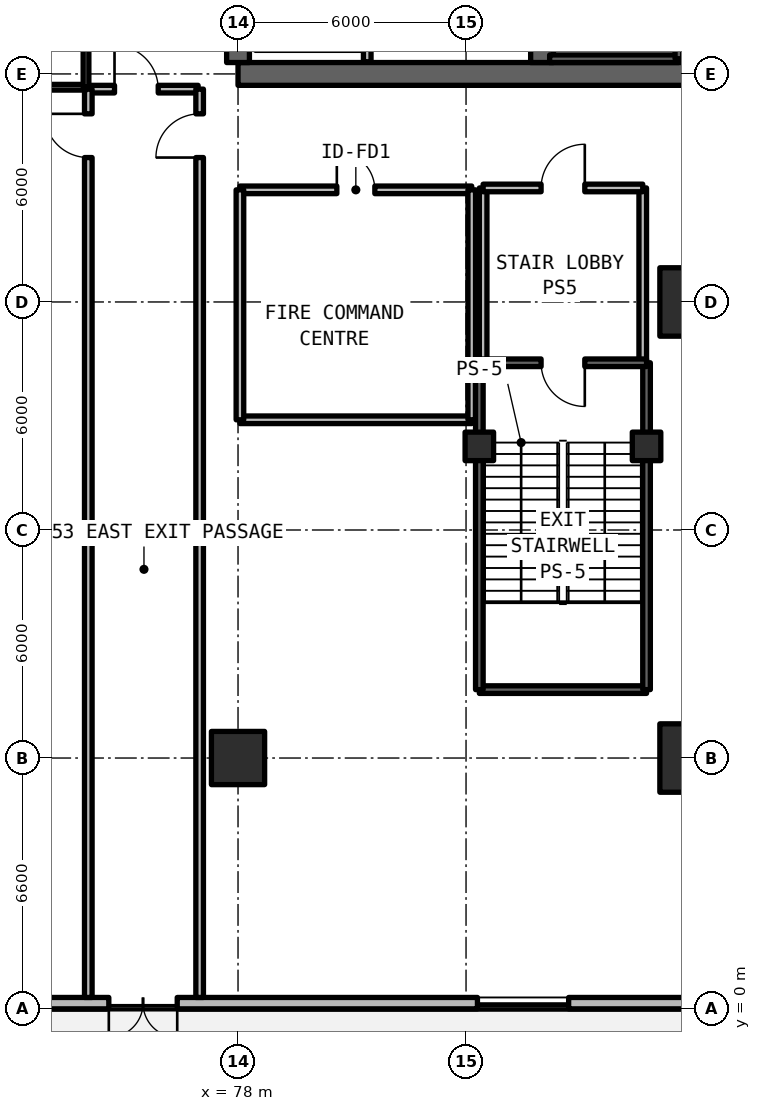
"""IFC4 building model, lengths in metres.
Left out: names, types, materials, properties, quantities, classifications, styles, units other than length and angle.
Written with IfcOpenShell. Run it as: python <this file> out.ifc"""

import sys

from ifc_helpers import new_model, si_unit, direction, frame, frame_2d, origin, origin_2d, place, context, subcontext, project, spatial, rectangle, circle, extrude, element, fill, save


model = new_model("IFC4")
c1 = context("Model", 3, precision=1e-05, world=origin(), true_north=direction((0.0, 1.0)))
c2 = subcontext(c1, "Body", "Model", "MODEL_VIEW")
j1 = project(units=[si_unit("LENGTHUNIT", "METRE"), si_unit("PLANEANGLEUNIT", "RADIAN")], contexts=[c1])
p1 = place(None, origin())
s1 = spatial("IfcSite", under=j1, at=p1, CompositionType="ELEMENT")
p2 = place(p1, origin())
s2 = spatial("IfcBuilding", under=s1, at=p2, CompositionType="ELEMENT")
p3 = place(p2, origin())
s3 = spatial("IfcBuildingStorey", under=s2, at=p3, CompositionType="ELEMENT", Elevation=0.0)
p4 = place(p3, frame((78.0, 24.6, 0.0), z_axis=(0.0, 0.0, 1.0), x_axis=(1.0, 0.0, 0.0)))
e1 = element("IfcWall", 1, at=p4, inside=s3, PredefinedType="SHEAR", context=c2, shape_type="SweptSolid", body=[
    extrude(rectangle(XDim=12.0, YDim=0.6, at=frame_2d((6.0, 0.0))), origin(), (0.0, 0.0, 1.0), 4.95),
])
p5 = place(p3, frame((78.0, 24.9, 0.0), z_axis=(0.0, 0.0, 1.0), x_axis=(0.0, 1.0, 0.0)))
e2 = element("IfcWall", 2, at=p5, inside=s3, PredefinedType="SHEAR", context=c2, shape_type="SweptSolid", body=[
    extrude(rectangle(XDim=8.9, YDim=0.6, at=frame_2d((4.45, 0.0))), origin(), (0.0, 0.0, 1.0), 4.95),
])
p6 = place(p3, frame((86.0, 24.9, 0.0), z_axis=(0.0, 0.0, 1.0), x_axis=(0.0, 1.0, 0.0)))
e3 = element("IfcWall", 3, at=p6, inside=s3, PredefinedType="SHEAR", context=c2, shape_type="SweptSolid", body=[
    extrude(rectangle(XDim=17.4, YDim=0.6, at=frame_2d((8.7, 0.0))), origin(), (0.0, 0.0, 1.0), 4.95),
])
p7 = place(p6, frame((0.35, 0.0, 0.0)))
e4 = element("IfcOpeningElement", 4, at=p7, cuts=e3, PredefinedType="OPENING", context=c2, shape_type="SweptSolid", body=[
    extrude(rectangle(XDim=1.15, YDim=2.15, at=frame_2d((0.575, 1.075))), frame((0.0, 0.31, 0.0), z_axis=(0.0, -1.0, 0.0), x_axis=(1.0, 0.0, 0.0)), (0.0, 0.0, 1.0), 0.62),
])
p8 = place(p6, frame((9.55, 0.0, 0.0)))
e5 = element("IfcOpeningElement", 5, at=p8, cuts=e3, PredefinedType="OPENING", context=c2, shape_type="SweptSolid", body=[
    extrude(rectangle(XDim=1.15, YDim=2.15, at=frame_2d((0.575, 1.075))), frame((0.0, 0.31, 0.0), z_axis=(0.0, -1.0, 0.0), x_axis=(1.0, 0.0, 0.0)), (0.0, 0.0, 1.0), 0.62),
])
p9 = place(p3, frame((78.0, 6.6, 0.0), z_axis=(0.0, 0.0, 1.0), x_axis=(1.0, 0.0, 0.0)))
e6 = element("IfcColumn", 6, at=p9, inside=s3, PredefinedType="COLUMN", context=c2, shape_type="SweptSolid", body=[
    extrude(circle(Radius=0.7, at=origin_2d()), origin(), (0.0, 0.0, 1.0), 4.95),
])
for number, where, z_axis, x_axis in (
    (7, (90.0, 6.6, 0.0), (0.0, 0.0, 1.0), (1.0, 0.0, 0.0)),
    (8, (90.0, 18.6, 0.0), (0.0, 0.0, 1.0), (1.0, 0.0, 0.0)),
):
    element("IfcColumn", number, at=place(p3, frame(where, z_axis=z_axis, x_axis=x_axis)), inside=s3, PredefinedType="COLUMN", context=c2, shape_type="SweptSolid", body=[
        extrude(rectangle(XDim=1.8, YDim=1.8, at=origin_2d()), origin(), (0.0, 0.0, 1.0), 4.95),
    ])
for number, where, z_axis, x_axis in (
    (9, (84.35, 14.8, 0.0), (0.0, 0.0, 1.0), (1.0, 0.0, 0.0)),
    (10, (88.75, 14.8, 0.0), (0.0, 0.0, 1.0), (1.0, 0.0, 0.0)),
):
    element("IfcColumn", number, at=place(p3, frame(where, z_axis=z_axis, x_axis=x_axis)), inside=s3, PredefinedType="COLUMN", context=c2, shape_type="SweptSolid", body=[
        extrude(rectangle(XDim=0.75, YDim=0.75, at=origin_2d()), origin(), (0.0, 0.0, 1.0), 4.95),
    ])
p10 = place(p3, frame((0.15, 0.15, 0.0), z_axis=(0.0, 0.0, 1.0), x_axis=(1.0, 0.0, 0.0)))
e11 = element("IfcWall", 11, at=p10, inside=s3, PredefinedType="SOLIDWALL", context=c2, shape_type="SweptSolid", body=[
    extrude(rectangle(XDim=113.7, YDim=0.3, at=frame_2d((56.85, 0.0))), origin(), (0.0, 0.0, 1.0), 4.67),
])
p11 = place(p10, frame((5.75, 0.0, 0.0)))
e12 = element("IfcOpeningElement", 12, at=p11, cuts=e11, PredefinedType="OPENING", context=c2, shape_type="SweptSolid", body=[
    extrude(rectangle(XDim=1.2, YDim=2.2, at=frame_2d((0.6, 1.1))), frame((0.0, 0.16, 0.0), z_axis=(0.0, -1.0, 0.0), x_axis=(1.0, 0.0, 0.0)), (0.0, 0.0, 1.0), 0.32),
])
p12 = place(p10, frame((17.05, 0.0, 0.0)))
e13 = element("IfcOpeningElement", 13, at=p12, cuts=e11, PredefinedType="OPENING", context=c2, shape_type="SweptSolid", body=[
    extrude(rectangle(XDim=4.2, YDim=3.2, at=frame_2d((2.1, 1.6))), frame((0.0, 0.16, 0.0), z_axis=(0.0, -1.0, 0.0), x_axis=(1.0, 0.0, 0.0)), (0.0, 0.0, 1.0), 0.32),
])
p13 = place(p10, frame((30.7, 0.0, 0.0)))
e14 = element("IfcOpeningElement", 14, at=p13, cuts=e11, PredefinedType="OPENING", context=c2, shape_type="SweptSolid", body=[
    extrude(rectangle(XDim=1.8, YDim=2.25, at=frame_2d((0.9, 1.125))), frame((0.0, 0.16, 0.0), z_axis=(0.0, -1.0, 0.0), x_axis=(1.0, 0.0, 0.0)), (0.0, 0.0, 1.0), 0.32),
])
p14 = place(p10, frame((40.95, 0.0, 0.0)))
e15 = element("IfcOpeningElement", 15, at=p14, cuts=e11, PredefinedType="OPENING", context=c2, shape_type="SweptSolid", body=[
    extrude(rectangle(XDim=1.8, YDim=2.25, at=frame_2d((0.9, 1.125))), frame((0.0, 0.16, 0.0), z_axis=(0.0, -1.0, 0.0), x_axis=(1.0, 0.0, 0.0)), (0.0, 0.0, 1.0), 0.32),
])
p15 = place(p10, frame((55.75, 0.0, 0.0)))
e16 = element("IfcOpeningElement", 16, at=p15, cuts=e11, PredefinedType="OPENING", context=c2, shape_type="SweptSolid", body=[
    extrude(rectangle(XDim=2.2, YDim=2.6, at=frame_2d((1.1, 1.3))), frame((0.0, 0.16, 0.0), z_axis=(0.0, -1.0, 0.0), x_axis=(1.0, 0.0, 0.0)), (0.0, 0.0, 1.0), 0.32),
])
p16 = place(p10, frame((74.45, 0.0, 0.0)))
e17 = element("IfcOpeningElement", 17, at=p16, cuts=e11, PredefinedType="OPENING", context=c2, shape_type="SweptSolid", body=[
    extrude(rectangle(XDim=1.8, YDim=2.25, at=frame_2d((0.9, 1.125))), frame((0.0, 0.16, 0.0), z_axis=(0.0, -1.0, 0.0), x_axis=(1.0, 0.0, 0.0)), (0.0, 0.0, 1.0), 0.32),
])
p17 = place(p10, frame((106.25, 0.0, 0.0)))
e18 = element("IfcOpeningElement", 18, at=p17, cuts=e11, PredefinedType="OPENING", context=c2, shape_type="SweptSolid", body=[
    extrude(rectangle(XDim=1.2, YDim=2.2, at=frame_2d((0.6, 1.1))), frame((0.0, 0.16, 0.0), z_axis=(0.0, -1.0, 0.0), x_axis=(1.0, 0.0, 0.0)), (0.0, 0.0, 1.0), 0.32),
])
p18 = place(p10, frame((68.18, 0.0, 0.78)))
e19 = element("IfcOpeningElement", 19, at=p18, cuts=e11, PredefinedType="OPENING", context=c2, shape_type="SweptSolid", body=[
    extrude(rectangle(XDim=2.4, YDim=1.66, at=frame_2d((1.2, 0.83))), frame((0.0, 0.16, 0.0), z_axis=(0.0, -1.0, 0.0), x_axis=(1.0, 0.0, 0.0)), (0.0, 0.0, 1.0), 0.32),
])
p19 = place(p10, frame((8.15, 0.0, 0.78)))
e20 = element("IfcOpeningElement", 20, at=p19, cuts=e11, PredefinedType="OPENING", context=c2, shape_type="SweptSolid", body=[
    extrude(rectangle(XDim=2.4, YDim=1.66, at=frame_2d((1.2, 0.83))), frame((0.0, 0.16, 0.0), z_axis=(0.0, -1.0, 0.0), x_axis=(1.0, 0.0, 0.0)), (0.0, 0.0, 1.0), 0.32),
])
p20 = place(p10, frame((84.15, 0.0, 0.78)))
e21 = element("IfcOpeningElement", 21, at=p20, cuts=e11, PredefinedType="OPENING", context=c2, shape_type="SweptSolid", body=[
    extrude(rectangle(XDim=2.4, YDim=1.66, at=frame_2d((1.2, 0.83))), frame((0.0, 0.16, 0.0), z_axis=(0.0, -1.0, 0.0), x_axis=(1.0, 0.0, 0.0)), (0.0, 0.0, 1.0), 0.32),
])
p21 = place(p10, frame((93.65, 0.0, 0.78)))
e22 = element("IfcOpeningElement", 22, at=p21, cuts=e11, PredefinedType="OPENING", context=c2, shape_type="SweptSolid", body=[
    extrude(rectangle(XDim=2.4, YDim=1.66, at=frame_2d((1.2, 0.83))), frame((0.0, 0.16, 0.0), z_axis=(0.0, -1.0, 0.0), x_axis=(1.0, 0.0, 0.0)), (0.0, 0.0, 1.0), 0.32),
])
p22 = place(p10, frame((103.15, 0.0, 0.78)))
e23 = element("IfcOpeningElement", 23, at=p22, cuts=e11, PredefinedType="OPENING", context=c2, shape_type="SweptSolid", body=[
    extrude(rectangle(XDim=2.4, YDim=1.66, at=frame_2d((1.2, 0.83))), frame((0.0, 0.16, 0.0), z_axis=(0.0, -1.0, 0.0), x_axis=(1.0, 0.0, 0.0)), (0.0, 0.0, 1.0), 0.32),
])
p23 = place(p3, frame((81.4, 24.92, 0.0), z_axis=(0.0, 0.0, 1.0), x_axis=(0.0, 1.0, 0.0)))
e24 = element("IfcWall", 24, at=p23, inside=s3, PredefinedType="SOLIDWALL", context=c2, shape_type="SweptSolid", body=[
    extrude(rectangle(XDim=3.58, YDim=0.2, at=frame_2d((1.79, 0.0))), origin(), (0.0, 0.0, 1.0), 3.89),
])
p24 = place(p23, frame((1.3, 0.0, 0.0)))
e25 = element("IfcOpeningElement", 25, at=p24, cuts=e24, PredefinedType="OPENING", context=c2, shape_type="SweptSolid", body=[
    extrude(rectangle(XDim=1.1, YDim=2.2, at=frame_2d((0.55, 1.1))), frame((0.0, 0.11, 0.0), z_axis=(0.0, -1.0, 0.0), x_axis=(1.0, 0.0, 0.0)), (0.0, 0.0, 1.0), 0.22),
])
p25 = place(p3, frame((74.1, 24.2, 0.0), z_axis=(0.0, 0.0, 1.0), x_axis=(1.0, 0.0, 0.0)))
e26 = element("IfcWall", 26, at=p25, inside=s3, PredefinedType="SOLIDWALL", context=c2, shape_type="SweptSolid", body=[
    extrude(rectangle(XDim=2.85, YDim=0.2, at=frame_2d((1.425, 0.0))), origin(), (0.0, 0.0, 1.0), 3.89),
])
p26 = place(p25, frame((0.65, 0.0, 0.0)))
e27 = element("IfcOpeningElement", 27, at=p26, cuts=e26, PredefinedType="OPENING", context=c2, shape_type="SweptSolid", body=[
    extrude(rectangle(XDim=1.15, YDim=2.15, at=frame_2d((0.575, 1.075))), frame((0.0, 0.11, 0.0), z_axis=(0.0, -1.0, 0.0), x_axis=(1.0, 0.0, 0.0)), (0.0, 0.0, 1.0), 0.22),
])
for number, where, z_axis, x_axis in (
    (28, (84.45, 17.0, 0.0), (0.0, 0.0, 1.0), (0.0, 1.0, 0.0)),
    (29, (88.65, 17.0, 0.0), (0.0, 0.0, 1.0), (0.0, 1.0, 0.0)),
):
    element("IfcWall", number, at=place(p3, frame(where, z_axis=z_axis, x_axis=x_axis)), inside=s3, PredefinedType="SOLIDWALL", context=c2, shape_type="SweptSolid", body=[
        extrude(rectangle(XDim=4.6, YDim=0.2, at=frame_2d((2.3, 0.0))), origin(), (0.0, 0.0, 1.0), 3.89),
    ])
p27 = place(p3, frame((84.45, 21.6, 0.0), z_axis=(0.0, 0.0, 1.0), x_axis=(1.0, 0.0, 0.0)))
e30 = element("IfcWall", 30, at=p27, inside=s3, PredefinedType="SOLIDWALL", context=c2, shape_type="SweptSolid", body=[
    extrude(rectangle(XDim=4.2, YDim=0.2, at=frame_2d((2.1, 0.0))), origin(), (0.0, 0.0, 1.0), 3.89),
])
p28 = place(p27, frame((1.525, 0.0, 0.0)))
e31 = element("IfcOpeningElement", 31, at=p28, cuts=e30, PredefinedType="OPENING", context=c2, shape_type="SweptSolid", body=[
    extrude(rectangle(XDim=1.15, YDim=2.15, at=frame_2d((0.575, 1.075))), frame((0.0, 0.11, 0.0), z_axis=(0.0, -1.0, 0.0), x_axis=(1.0, 0.0, 0.0)), (0.0, 0.0, 1.0), 0.22),
])
p29 = place(p3, frame((74.06, 0.3, 0.0), z_axis=(0.0, 0.0, 1.0), x_axis=(0.0, 1.0, 0.0)))
e32 = element("IfcWall", 32, at=p29, inside=s3, PredefinedType="SOLIDWALL", context=c2, shape_type="SweptSolid", body=[
    extrude(rectangle(XDim=23.9, YDim=0.2, at=frame_2d((11.95, 0.0))), origin(), (0.0, 0.0, 1.0), 3.89),
])
p30 = place(p29, frame((22.1, 0.0, 0.0)))
e33 = element("IfcOpeningElement", 33, at=p30, cuts=e32, PredefinedType="OPENING", context=c2, shape_type="SweptSolid", body=[
    extrude(rectangle(XDim=1.15, YDim=2.15, at=frame_2d((0.575, 1.075))), frame((0.0, 0.11, 0.0), z_axis=(0.0, -1.0, 0.0), x_axis=(1.0, 0.0, 0.0)), (0.0, 0.0, 1.0), 0.22),
])
p31 = place(p3, frame((76.99, 0.3, 0.0), z_axis=(0.0, 0.0, 1.0), x_axis=(0.0, 1.0, 0.0)))
e34 = element("IfcWall", 34, at=p31, inside=s3, PredefinedType="SOLIDWALL", context=c2, shape_type="SweptSolid", body=[
    extrude(rectangle(XDim=23.9, YDim=0.2, at=frame_2d((11.95, 0.0))), origin(), (0.0, 0.0, 1.0), 3.89),
])
p32 = place(p31, frame((22.1, 0.0, 0.0)))
e35 = element("IfcOpeningElement", 35, at=p32, cuts=e34, PredefinedType="OPENING", context=c2, shape_type="SweptSolid", body=[
    extrude(rectangle(XDim=1.15, YDim=2.15, at=frame_2d((0.575, 1.075))), frame((0.0, 0.11, 0.0), z_axis=(0.0, -1.0, 0.0), x_axis=(1.0, 0.0, 0.0)), (0.0, 0.0, 1.0), 0.22),
])
p33 = place(p3, frame((40.0, 24.25, 0.0), z_axis=(0.0, 0.0, 1.0), x_axis=(1.0, 0.0, 0.0)))
e36 = element("IfcWall", 36, at=p33, inside=s3, PredefinedType="SOLIDWALL", context=c2, shape_type="SweptSolid", body=[
    extrude(rectangle(XDim=34.0, YDim=0.15, at=frame_2d((17.0, 0.0))), origin(), (0.0, 0.0, 1.0), 3.89),
])
p34 = place(p3, frame((74.0, 24.25, 0.0), z_axis=(0.0, 0.0, 1.0), x_axis=(0.0, 1.0, 0.0)))
e37 = element("IfcWall", 37, at=p34, inside=s3, PredefinedType="SOLIDWALL", context=c2, shape_type="SweptSolid", body=[
    extrude(rectangle(XDim=18.7, YDim=0.15, at=frame_2d((9.35, 0.0))), origin(), (0.0, 0.0, 1.0), 3.89),
])
p35 = place(p3, frame((78.05, 15.5, 0.0), z_axis=(0.0, 0.0, 1.0), x_axis=(1.0, 0.0, 0.0)))
e38 = element("IfcWall", 38, at=p35, inside=s3, PredefinedType="SOLIDWALL", context=c2, shape_type="SweptSolid", body=[
    extrude(rectangle(XDim=6.1, YDim=0.2, at=frame_2d((3.05, 0.0))), origin(), (0.0, 0.0, 1.0), 3.89),
])
p36 = place(p3, frame((78.05, 21.55, 0.0), z_axis=(0.0, 0.0, 1.0), x_axis=(1.0, 0.0, 0.0)))
e39 = element("IfcWall", 39, at=p36, inside=s3, PredefinedType="SOLIDWALL", context=c2, shape_type="SweptSolid", body=[
    extrude(rectangle(XDim=6.1, YDim=0.2, at=frame_2d((3.05, 0.0))), origin(), (0.0, 0.0, 1.0), 3.89),
])
p37 = place(p36, frame((2.55, 0.0, 0.0)))
e40 = element("IfcOpeningElement", 40, at=p37, cuts=e39, PredefinedType="OPENING", context=c2, shape_type="SweptSolid", body=[
    extrude(rectangle(XDim=1.0, YDim=2.15, at=frame_2d((0.5, 1.075))), frame((0.0, 0.11, 0.0), z_axis=(0.0, -1.0, 0.0), x_axis=(1.0, 0.0, 0.0)), (0.0, 0.0, 1.0), 0.22),
])
p38 = place(p3, frame((78.05, 15.5, 0.0), z_axis=(0.0, 0.0, 1.0), x_axis=(0.0, 1.0, 0.0)))
e41 = element("IfcWall", 41, at=p38, inside=s3, PredefinedType="SOLIDWALL", context=c2, shape_type="SweptSolid", body=[
    extrude(rectangle(XDim=6.05, YDim=0.2, at=frame_2d((3.025, 0.0))), origin(), (0.0, 0.0, 1.0), 3.885),
])
p39 = place(p3, frame((84.15, 15.5, 0.0), z_axis=(0.0, 0.0, 1.0), x_axis=(0.0, 1.0, 0.0)))
e42 = element("IfcWall", 42, at=p39, inside=s3, PredefinedType="SOLIDWALL", context=c2, shape_type="SweptSolid", body=[
    extrude(rectangle(XDim=6.05, YDim=0.2, at=frame_2d((3.025, 0.0))), origin(), (0.0, 0.0, 1.0), 3.89),
])
p40 = place(p3, frame((86.2, 25.0, 0.0), z_axis=(0.0, 0.0, 1.0), x_axis=(1.0, 0.0, 0.0)))
e43 = element("IfcWall", 43, at=p40, inside=s3, PredefinedType="SOLIDWALL", context=c2, shape_type="SweptSolid", body=[
    extrude(rectangle(XDim=3.4, YDim=0.2, at=frame_2d((1.7, 0.0))), origin(), (0.0, 0.0, 1.0), 4.95),
])
p41 = place(p3, frame((89.6, 25.0, 0.0), z_axis=(0.0, 0.0, 1.0), x_axis=(0.0, 1.0, 0.0)))
e44 = element("IfcWall", 44, at=p41, inside=s3, PredefinedType="SOLIDWALL", context=c2, shape_type="SweptSolid", body=[
    extrude(rectangle(XDim=8.0, YDim=0.2, at=frame_2d((4.0, 0.0))), origin(), (0.0, 0.0, 1.0), 4.95),
])
p42 = place(p3, frame((84.35, 8.4, 0.0), z_axis=(0.0, 0.0, 1.0), x_axis=(1.0, 0.0, 0.0)))
e45 = element("IfcWall", 45, at=p42, inside=s3, PredefinedType="SOLIDWALL", context=c2, shape_type="SweptSolid", body=[
    extrude(rectangle(XDim=4.4, YDim=0.2, at=frame_2d((2.2, 0.0))), origin(), (0.0, 0.0, 1.0), 4.95),
])
p43 = place(p3, frame((88.75, 8.4, 0.0), z_axis=(0.0, 0.0, 1.0), x_axis=(0.0, 1.0, 0.0)))
e46 = element("IfcWall", 46, at=p43, inside=s3, PredefinedType="SOLIDWALL", context=c2, shape_type="SweptSolid", body=[
    extrude(rectangle(XDim=8.6, YDim=0.2, at=frame_2d((4.3, 0.0))), origin(), (0.0, 0.0, 1.0), 4.95),
])
p44 = place(p3, frame((88.75, 17.0, 0.0), z_axis=(0.0, 0.0, 1.0), x_axis=(-1.0, 0.0, 0.0)))
e47 = element("IfcWall", 47, at=p44, inside=s3, PredefinedType="SOLIDWALL", context=c2, shape_type="SweptSolid", body=[
    extrude(rectangle(XDim=4.4, YDim=0.2, at=frame_2d((2.2, 0.0))), origin(), (0.0, 0.0, 1.0), 4.95),
])
p45 = place(p44, frame((1.625, 0.0, 0.0)))
e48 = element("IfcOpeningElement", 48, at=p45, cuts=e47, PredefinedType="OPENING", context=c2, shape_type="SweptSolid", body=[
    extrude(rectangle(XDim=1.15, YDim=2.15, at=frame_2d((0.575, 1.075))), frame((0.0, 0.11, 0.0), z_axis=(0.0, -1.0, 0.0), x_axis=(1.0, 0.0, 0.0)), (0.0, 0.0, 1.0), 0.22),
])
p46 = place(p3, frame((84.35, 17.0, 0.0), z_axis=(0.0, 0.0, 1.0), x_axis=(0.0, -1.0, 0.0)))
e49 = element("IfcWall", 49, at=p46, inside=s3, PredefinedType="SOLIDWALL", context=c2, shape_type="SweptSolid", body=[
    extrude(rectangle(XDim=8.6, YDim=0.2, at=frame_2d((4.3, 0.0))), origin(), (0.0, 0.0, 1.0), 4.95),
])
p47 = place(p16, frame((1.8, 0.0, 0.0), z_axis=(0.0, 0.0, 1.0), x_axis=(-1.0, 0.0, 0.0)))
e50 = element("IfcDoor", 50, at=p47, inside=s3, OperationType="SINGLE_SWING_LEFT", PredefinedType="DOOR", context=c2, shape_type="SweptSolid", body=[
    extrude(rectangle(XDim=1.8, YDim=2.25, at=frame_2d((0.9, 1.125))), frame((0.0, 0.025, 0.0), z_axis=(0.0, -1.0, 0.0), x_axis=(1.0, 0.0, 0.0)), (0.0, 0.0, 1.0), 0.05),
])
fill(e17, e50)
p48 = place(p20, origin())
e51 = element("IfcWindow", 51, at=p48, inside=s3, PartitioningType="SINGLE_PANEL", PredefinedType="WINDOW", context=c2, shape_type="SweptSolid", body=[
    extrude(rectangle(XDim=2.4, YDim=1.66, at=frame_2d((1.2, 0.83))), frame((0.0, 0.03, 0.0), z_axis=(0.0, -1.0, 0.0), x_axis=(1.0, 0.0, 0.0)), (0.0, 0.0, 1.0), 0.06),
])
fill(e21, e51)
p49 = place(p26, frame((1.15, 0.0, 0.0), z_axis=(0.0, 0.0, 1.0), x_axis=(-1.0, 0.0, 0.0)))
e52 = element("IfcDoor", 52, at=p49, inside=s3, OperationType="SINGLE_SWING_LEFT", PredefinedType="DOOR", context=c2, shape_type="SweptSolid", body=[
    extrude(rectangle(XDim=1.15, YDim=2.15, at=frame_2d((0.575, 1.075))), frame((0.0, 0.025, 0.0), z_axis=(0.0, -1.0, 0.0), x_axis=(1.0, 0.0, 0.0)), (0.0, 0.0, 1.0), 0.05),
])
fill(e27, e52)
p50 = place(p28, origin())
e53 = element("IfcDoor", 53, at=p50, inside=s3, OperationType="SINGLE_SWING_RIGHT", PredefinedType="DOOR", context=c2, shape_type="SweptSolid", body=[
    extrude(rectangle(XDim=1.15, YDim=2.15, at=frame_2d((0.575, 1.075))), frame((0.0, 0.025, 0.0), z_axis=(0.0, -1.0, 0.0), x_axis=(1.0, 0.0, 0.0)), (0.0, 0.0, 1.0), 0.05),
])
fill(e31, e53)
p51 = place(p30, frame((1.15, 0.0, 0.0), z_axis=(0.0, 0.0, 1.0), x_axis=(-1.0, 0.0, 0.0)))
e54 = element("IfcDoor", 54, at=p51, inside=s3, OperationType="SINGLE_SWING_RIGHT", PredefinedType="DOOR", context=c2, shape_type="SweptSolid", body=[
    extrude(rectangle(XDim=1.15, YDim=2.15, at=frame_2d((0.575, 1.075))), frame((0.0, 0.025, 0.0), z_axis=(0.0, -1.0, 0.0), x_axis=(1.0, 0.0, 0.0)), (0.0, 0.0, 1.0), 0.05),
])
fill(e33, e54)
p52 = place(p32, origin())
e55 = element("IfcDoor", 55, at=p52, inside=s3, OperationType="SINGLE_SWING_LEFT", PredefinedType="DOOR", context=c2, shape_type="SweptSolid", body=[
    extrude(rectangle(XDim=1.15, YDim=2.15, at=frame_2d((0.575, 1.075))), frame((0.0, 0.025, 0.0), z_axis=(0.0, -1.0, 0.0), x_axis=(1.0, 0.0, 0.0)), (0.0, 0.0, 1.0), 0.05),
])
fill(e35, e55)
p53 = place(p37, origin())
e56 = element("IfcDoor", 56, at=p53, inside=s3, OperationType="SINGLE_SWING_LEFT", PredefinedType="DOOR", context=c2, shape_type="SweptSolid", body=[
    extrude(rectangle(XDim=1.0, YDim=2.15, at=frame_2d((0.5, 1.075))), frame((0.0, 0.025, 0.0), z_axis=(0.0, -1.0, 0.0), x_axis=(1.0, 0.0, 0.0)), (0.0, 0.0, 1.0), 0.05),
])
fill(e40, e56)
p54 = place(p45, frame((1.15, 0.0, 0.0), z_axis=(0.0, 0.0, 1.0), x_axis=(-1.0, 0.0, 0.0)))
e57 = element("IfcDoor", 57, at=p54, inside=s3, OperationType="SINGLE_SWING_LEFT", PredefinedType="DOOR", context=c2, shape_type="SweptSolid", body=[
    extrude(rectangle(XDim=1.15, YDim=2.15, at=frame_2d((0.575, 1.075))), frame((0.0, 0.025, 0.0), z_axis=(0.0, -1.0, 0.0), x_axis=(1.0, 0.0, 0.0)), (0.0, 0.0, 1.0), 0.05),
])
fill(e48, e57)
save(model, sys.argv[1])
